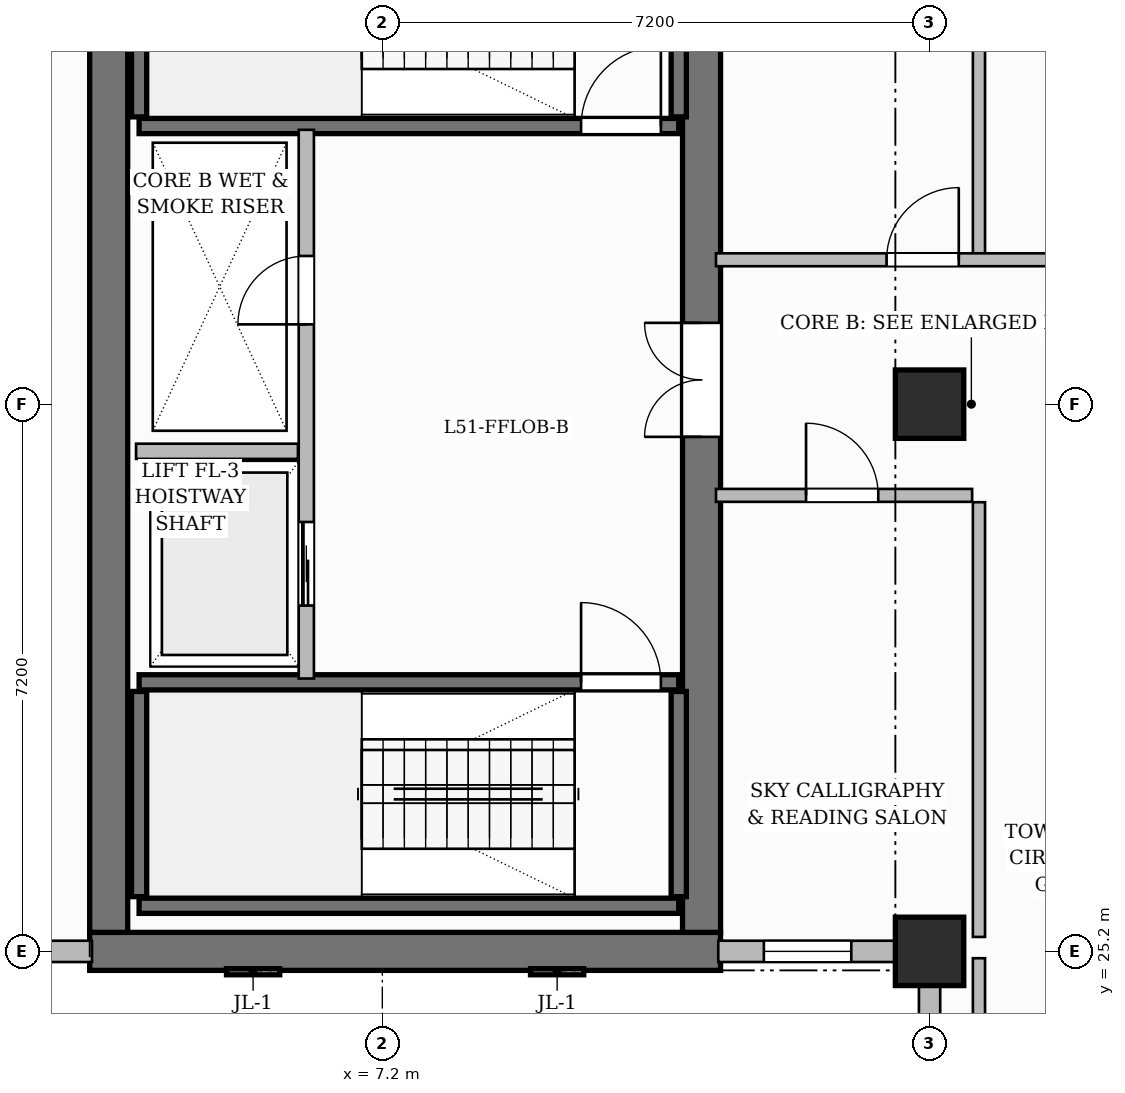
"""IFC4 building model, lengths in metres.
Left out: names, types, materials, properties, quantities, classifications, styles, units other than length and angle.
Written with IfcOpenShell. Run it as: python <this file> out.ifc"""

import sys

from ifc_helpers import new_model, si_unit, direction, frame, frame_2d, origin, origin_2d, place, context, subcontext, project, spatial, rectangle, extrude, source, transform, mapped, element, fill, save


model = new_model("IFC4")
c1 = context("Model", 3, precision=1e-05, world=origin(), true_north=direction((0.0, 1.0)))
c2 = subcontext(c1, "Body", "Model", "MODEL_VIEW")
j1 = project(units=[si_unit("LENGTHUNIT", "METRE"), si_unit("PLANEANGLEUNIT", "RADIAN")], contexts=[c1])
p1 = place(None, origin())
s1 = spatial("IfcSite", under=j1, at=p1, CompositionType="ELEMENT")
p2 = place(p1, origin())
s2 = spatial("IfcBuilding", under=s1, at=p2, CompositionType="ELEMENT")
p3 = place(p2, frame((0.0, 0.0, 205.75)))
s3 = spatial("IfcBuildingStorey", under=s2, at=p3, CompositionType="ELEMENT", Elevation=205.75)
p4 = place(p3, frame((3.35, 25.2, 0.0), z_axis=(0.0, 0.0, 1.0), x_axis=(1.0, 0.0, 0.0)))
e1 = element("IfcWall", 1, at=p4, inside=s3, PredefinedType="SHEAR", context=c2, shape_type="SweptSolid", body=[
    extrude(rectangle(XDim=8.3, YDim=0.5, at=frame_2d((4.15, 0.0))), origin(), (0.0, 0.0, 1.0), 3.85),
])
p5 = place(p3, frame((3.6, 25.45, 0.0), z_axis=(0.0, 0.0, 1.0), x_axis=(0.0, 1.0, 0.0)))
e2 = element("IfcWall", 2, at=p5, inside=s3, PredefinedType="SHEAR", context=c2, shape_type="SweptSolid", body=[
    extrude(rectangle(XDim=13.9, YDim=0.5, at=frame_2d((6.95, 0.0))), origin(), (0.0, 0.0, 1.0), 3.85),
])
p6 = place(p3, frame((11.4, 25.45, 0.0), z_axis=(0.0, 0.0, 1.0), x_axis=(0.0, 1.0, 0.0)))
e3 = element("IfcWall", 3, at=p6, inside=s3, PredefinedType="SHEAR", context=c2, shape_type="SweptSolid", body=[
    extrude(rectangle(XDim=13.9, YDim=0.5, at=frame_2d((6.95, 0.0))), origin(), (0.0, 0.0, 1.0), 3.85),
])
p7 = place(p6, frame((6.52, 0.0, 0.0)))
e4 = element("IfcOpeningElement", 4, at=p7, cuts=e3, PredefinedType="OPENING", context=c2, shape_type="SweptSolid", body=[
    extrude(rectangle(XDim=1.5, YDim=2.2, at=frame_2d((0.75, 1.1))), frame((0.0, 0.26, 0.0), z_axis=(0.0, -1.0, 0.0), x_axis=(1.0, 0.0, 0.0)), (0.0, 0.0, 1.0), 0.52),
])
m1 = source(origin(), c2, "Body", "SweptSolid", [
    extrude(rectangle(XDim=0.9, YDim=0.9, at=origin_2d()), origin(), (0.0, 0.0, 1.0), 3.85),
])
for number, where, z_axis, x_axis in (
    (5, (14.4, 25.2, 0.0), (0.0, 0.0, 1.0), (1.0, 0.0, 0.0)),
    (6, (14.4, 32.4, 0.0), (0.0, 0.0, 1.0), (1.0, 0.0, 0.0)),
):
    element("IfcColumn", number, at=place(p3, frame(where, z_axis=z_axis, x_axis=x_axis)), inside=s3, PredefinedType="COLUMN", context=c2, shape_type="MappedRepresentation", body=[
        mapped(m1, transform((0.0, 0.0, 0.0), scale=1.0)),
    ])
p8 = place(p3, frame((4.0, 25.8, 0.0), z_axis=(0.0, 0.0, 1.0), x_axis=(1.0, 0.0, 0.0)))
e7 = element("IfcWall", 7, at=p8, inside=s3, PredefinedType="SHEAR", context=c2, shape_type="SweptSolid", body=[
    extrude(rectangle(XDim=7.1, YDim=0.2, at=frame_2d((3.55, 0.0))), origin(), (0.0, 0.0, 1.0), 3.85),
])
for number, where, z_axis, x_axis in (
    (8, (4.0, 25.92, 0.0), (0.0, 0.0, 1.0), (0.0, 1.0, 0.0)),
    (9, (11.1, 25.92, 0.0), (0.0, 0.0, 1.0), (0.0, 1.0, 0.0)),
):
    element("IfcWall", number, at=place(p3, frame(where, z_axis=z_axis, x_axis=x_axis)), inside=s3, PredefinedType="SHEAR", context=c2, shape_type="SweptSolid", body=[
        extrude(rectangle(XDim=2.7, YDim=0.2, at=frame_2d((1.35, 0.0))), origin(), (0.0, 0.0, 1.0), 3.85),
    ])
p9 = place(p3, frame((4.0, 28.74, 0.0), z_axis=(0.0, 0.0, 1.0), x_axis=(1.0, 0.0, 0.0)))
e10 = element("IfcWall", 10, at=p9, inside=s3, PredefinedType="SHEAR", context=c2, shape_type="SweptSolid", body=[
    extrude(rectangle(XDim=7.1, YDim=0.2, at=frame_2d((3.55, 0.0))), origin(), (0.0, 0.0, 1.0), 3.85),
])
p10 = place(p9, frame((5.815, 0.0, 0.0)))
e11 = element("IfcOpeningElement", 11, at=p10, cuts=e10, PredefinedType="OPENING", context=c2, shape_type="SweptSolid", body=[
    extrude(rectangle(XDim=1.05, YDim=2.2, at=frame_2d((0.525, 1.1))), frame((0.0, 0.11, 0.0), z_axis=(0.0, -1.0, 0.0), x_axis=(1.0, 0.0, 0.0)), (0.0, 0.0, 1.0), 0.22),
])
for number, where, z_axis, x_axis in (
    (12, (4.0, 36.18, 0.0), (0.0, 0.0, 1.0), (0.0, 1.0, 0.0)),
    (13, (11.1, 36.18, 0.0), (0.0, 0.0, 1.0), (0.0, 1.0, 0.0)),
):
    element("IfcWall", number, at=place(p3, frame(where, z_axis=z_axis, x_axis=x_axis)), inside=s3, PredefinedType="SHEAR", context=c2, shape_type="SweptSolid", body=[
        extrude(rectangle(XDim=2.7, YDim=0.2, at=frame_2d((1.35, 0.0))), origin(), (0.0, 0.0, 1.0), 3.85),
    ])
p11 = place(p3, frame((4.0, 36.06, 0.0), z_axis=(0.0, 0.0, 1.0), x_axis=(1.0, 0.0, 0.0)))
e14 = element("IfcWall", 14, at=p11, inside=s3, PredefinedType="SHEAR", context=c2, shape_type="SweptSolid", body=[
    extrude(rectangle(XDim=7.1, YDim=0.2, at=frame_2d((3.55, 0.0))), origin(), (0.0, 0.0, 1.0), 3.85),
])
p12 = place(p11, frame((5.815, 0.0, 0.0)))
e15 = element("IfcOpeningElement", 15, at=p12, cuts=e14, PredefinedType="OPENING", context=c2, shape_type="SweptSolid", body=[
    extrude(rectangle(XDim=1.05, YDim=2.2, at=frame_2d((0.525, 1.1))), frame((0.0, 0.11, 0.0), z_axis=(0.0, -1.0, 0.0), x_axis=(1.0, 0.0, 0.0)), (0.0, 0.0, 1.0), 0.22),
])
p13 = place(p3, frame((6.2, 28.79, 0.0), z_axis=(0.0, 0.0, 1.0), x_axis=(0.0, 1.0, 0.0)))
e16 = element("IfcWall", 16, at=p13, inside=s3, PredefinedType="PARTITIONING", context=c2, shape_type="SweptSolid", body=[
    extrude(rectangle(XDim=7.22, YDim=0.2, at=frame_2d((3.61, 0.0))), origin(), (0.0, 0.0, 1.0), 3.6),
])
p14 = place(p13, frame((4.66, 0.0, 0.0)))
e17 = element("IfcOpeningElement", 17, at=p14, cuts=e16, PredefinedType="OPENING", context=c2, shape_type="SweptSolid", body=[
    extrude(rectangle(XDim=0.9, YDim=2.1, at=frame_2d((0.45, 1.05))), frame((0.0, 0.11, 0.0), z_axis=(0.0, -1.0, 0.0), x_axis=(1.0, 0.0, 0.0)), (0.0, 0.0, 1.0), 0.22),
])
p15 = place(p13, frame((0.96, 0.0, 0.0)))
e18 = element("IfcOpeningElement", 18, at=p15, cuts=e16, PredefinedType="OPENING", context=c2, shape_type="SweptSolid", body=[
    extrude(rectangle(XDim=1.1, YDim=2.2, at=frame_2d((0.55, 1.1))), frame((0.0, 0.11, 0.0), z_axis=(0.0, -1.0, 0.0), x_axis=(1.0, 0.0, 0.0)), (0.0, 0.0, 1.0), 0.22),
])
p16 = place(p3, frame((3.96, 31.78, 0.0), z_axis=(0.0, 0.0, 1.0), x_axis=(1.0, 0.0, 0.0)))
e19 = element("IfcWall", 19, at=p16, inside=s3, PredefinedType="PARTITIONING", context=c2, shape_type="SweptSolid", body=[
    extrude(rectangle(XDim=2.13, YDim=0.2, at=frame_2d((1.065, 0.0))), origin(), (0.0, 0.0, 1.0), 3.6),
])
p17 = place(p3, frame((15.05, 11.96, 0.0), z_axis=(0.0, 0.0, 1.0), x_axis=(0.0, 1.0, 0.0)))
e20 = element("IfcWall", 20, at=p17, inside=s3, PredefinedType="PARTITIONING", context=c2, shape_type="SweptSolid", body=[
    extrude(rectangle(XDim=13.15, YDim=0.16, at=frame_2d((6.575, 0.0))), origin(), (0.0, 0.0, 1.0), 3.6),
])
p18 = place(p3, frame((15.05, 34.34, 0.0), z_axis=(0.0, 0.0, 1.0), x_axis=(0.0, 1.0, 0.0)))
e21 = element("IfcWall", 21, at=p18, inside=s3, PredefinedType="PARTITIONING", context=c2, shape_type="SweptSolid", body=[
    extrude(rectangle(XDim=5.22, YDim=0.16, at=frame_2d((2.61, 0.0))), origin(), (0.0, 0.0, 1.0), 3.6),
])
p19 = place(p3, frame((15.05, 25.39, 0.0), z_axis=(0.0, 0.0, 1.0), x_axis=(0.0, 1.0, 0.0)))
e22 = element("IfcWall", 22, at=p19, inside=s3, PredefinedType="PARTITIONING", context=c2, shape_type="SweptSolid", body=[
    extrude(rectangle(XDim=5.72, YDim=0.16, at=frame_2d((2.86, 0.0))), origin(), (0.0, 0.0, 1.0), 3.6),
])
p20 = place(p3, frame((11.59, 31.2, 0.0), z_axis=(0.0, 0.0, 1.0), x_axis=(1.0, 0.0, 0.0)))
e23 = element("IfcWall", 23, at=p20, inside=s3, PredefinedType="PARTITIONING", context=c2, shape_type="SweptSolid", body=[
    extrude(rectangle(XDim=3.37, YDim=0.17, at=frame_2d((1.685, 0.0))), origin(), (0.0, 0.0, 1.0), 3.6),
])
p21 = place(p20, frame((1.185, 0.0, 0.0)))
e24 = element("IfcOpeningElement", 24, at=p21, cuts=e23, PredefinedType="OPENING", context=c2, shape_type="SweptSolid", body=[
    extrude(rectangle(XDim=0.95, YDim=2.15, at=frame_2d((0.475, 1.075))), frame((0.0, 0.095, 0.0), z_axis=(0.0, -1.0, 0.0), x_axis=(1.0, 0.0, 0.0)), (0.0, 0.0, 1.0), 0.19),
])
p22 = place(p3, frame((11.59, 34.3, 0.0), z_axis=(0.0, 0.0, 1.0), x_axis=(1.0, 0.0, 0.0)))
e25 = element("IfcWall", 25, at=p22, inside=s3, PredefinedType="PARTITIONING", context=c2, shape_type="SweptSolid", body=[
    extrude(rectangle(XDim=6.262, YDim=0.17, at=frame_2d((3.131, 0.0))), origin(), (0.0, 0.0, 1.0), 3.6),
])
p23 = place(p22, frame((2.244, 0.0, 0.0)))
e26 = element("IfcOpeningElement", 26, at=p23, cuts=e25, PredefinedType="OPENING", context=c2, shape_type="SweptSolid", body=[
    extrude(rectangle(XDim=0.95, YDim=2.15, at=frame_2d((0.475, 1.075))), frame((0.0, 0.095, 0.0), z_axis=(0.0, -1.0, 0.0), x_axis=(1.0, 0.0, 0.0)), (0.0, 0.0, 1.0), 0.19),
])
p24 = place(p3, frame((14.4, 0.05, 0.0), z_axis=(0.0, 0.0, 1.0), x_axis=(0.0, 1.0, 0.0)))
e27 = element("IfcWall", 27, at=p24, inside=s3, PredefinedType="SOLIDWALL", context=c2, shape_type="SweptSolid", body=[
    extrude(rectangle(XDim=25.1, YDim=0.28, at=frame_2d((12.55, 0.0))), origin(), (0.0, 0.0, 1.0), 3.085),
])
p25 = place(p24, frame((2.75, 0.0, 0.0)))
e28 = element("IfcOpeningElement", 28, at=p25, cuts=e27, PredefinedType="OPENING", context=c2, shape_type="SweptSolid", body=[
    extrude(rectangle(XDim=1.2, YDim=2.2, at=frame_2d((0.6, 1.1))), frame((0.0, 0.15, 0.0), z_axis=(0.0, -1.0, 0.0), x_axis=(1.0, 0.0, 0.0)), (0.0, 0.0, 1.0), 0.3),
])
p26 = place(p24, frame((1.025, 0.0, 0.8)))
e29 = element("IfcOpeningElement", 29, at=p26, cuts=e27, PredefinedType="OPENING", context=c2, shape_type="SweptSolid", body=[
    extrude(rectangle(XDim=1.15, YDim=1.8, at=frame_2d((0.575, 0.9))), frame((0.0, 0.15, 0.0), z_axis=(0.0, -1.0, 0.0), x_axis=(1.0, 0.0, 0.0)), (0.0, 0.0, 1.0), 0.3),
])
p27 = place(p24, frame((5.154, 0.0, 0.8)))
e30 = element("IfcOpeningElement", 30, at=p27, cuts=e27, PredefinedType="OPENING", context=c2, shape_type="SweptSolid", body=[
    extrude(rectangle(XDim=0.95, YDim=1.75, at=frame_2d((0.475, 0.875))), frame((0.0, 0.15, 0.0), z_axis=(0.0, -1.0, 0.0), x_axis=(1.0, 0.0, 0.0)), (0.0, 0.0, 1.0), 0.3),
])
p28 = place(p24, frame((8.346, 0.0, 0.8)))
e31 = element("IfcOpeningElement", 31, at=p28, cuts=e27, PredefinedType="OPENING", context=c2, shape_type="SweptSolid", body=[
    extrude(rectangle(XDim=1.15, YDim=1.8, at=frame_2d((0.575, 0.9))), frame((0.0, 0.15, 0.0), z_axis=(0.0, -1.0, 0.0), x_axis=(1.0, 0.0, 0.0)), (0.0, 0.0, 1.0), 0.3),
])
p29 = place(p24, frame((10.285, 0.0, 0.8)))
e32 = element("IfcOpeningElement", 32, at=p29, cuts=e27, PredefinedType="OPENING", context=c2, shape_type="SweptSolid", body=[
    extrude(rectangle(XDim=1.15, YDim=1.8, at=frame_2d((0.575, 0.9))), frame((0.0, 0.15, 0.0), z_axis=(0.0, -1.0, 0.0), x_axis=(1.0, 0.0, 0.0)), (0.0, 0.0, 1.0), 0.3),
])
p30 = place(p24, frame((12.114, 0.0, 0.8)))
e33 = element("IfcOpeningElement", 33, at=p30, cuts=e27, PredefinedType="OPENING", context=c2, shape_type="SweptSolid", body=[
    extrude(rectangle(XDim=1.15, YDim=1.8, at=frame_2d((0.575, 0.9))), frame((0.0, 0.15, 0.0), z_axis=(0.0, -1.0, 0.0), x_axis=(1.0, 0.0, 0.0)), (0.0, 0.0, 1.0), 0.3),
])
p31 = place(p24, frame((15.675, 0.0, 0.8)))
e34 = element("IfcOpeningElement", 34, at=p31, cuts=e27, PredefinedType="OPENING", context=c2, shape_type="SweptSolid", body=[
    extrude(rectangle(XDim=1.8, YDim=1.85, at=frame_2d((0.9, 0.925))), frame((0.0, 0.15, 0.0), z_axis=(0.0, -1.0, 0.0), x_axis=(1.0, 0.0, 0.0)), (0.0, 0.0, 1.0), 0.3),
])
p32 = place(p24, frame((18.425, 0.0, 0.8)))
e35 = element("IfcOpeningElement", 35, at=p32, cuts=e27, PredefinedType="OPENING", context=c2, shape_type="SweptSolid", body=[
    extrude(rectangle(XDim=1.8, YDim=1.85, at=frame_2d((0.9, 0.925))), frame((0.0, 0.15, 0.0), z_axis=(0.0, -1.0, 0.0), x_axis=(1.0, 0.0, 0.0)), (0.0, 0.0, 1.0), 0.3),
])
p33 = place(p24, frame((22.65, 0.0, 0.8)))
e36 = element("IfcOpeningElement", 36, at=p33, cuts=e27, PredefinedType="OPENING", context=c2, shape_type="SweptSolid", body=[
    extrude(rectangle(XDim=1.4, YDim=1.85, at=frame_2d((0.7, 0.925))), frame((0.0, 0.15, 0.0), z_axis=(0.0, -1.0, 0.0), x_axis=(1.0, 0.0, 0.0)), (0.0, 0.0, 1.0), 0.3),
])
p34 = place(p3, frame((11.62, 25.2, 0.0), z_axis=(0.0, 0.0, 1.0), x_axis=(1.0, 0.0, 0.0)))
e37 = element("IfcWall", 37, at=p34, inside=s3, PredefinedType="SOLIDWALL", context=c2, shape_type="SweptSolid", body=[
    extrude(rectangle(XDim=2.78, YDim=0.28, at=frame_2d((1.39, 0.0))), origin(), (0.0, 0.0, 1.0), 3.085),
])
p35 = place(p34, frame((0.6, 0.0, 0.8)))
e38 = element("IfcOpeningElement", 38, at=p35, cuts=e37, PredefinedType="OPENING", context=c2, shape_type="SweptSolid", body=[
    extrude(rectangle(XDim=1.15, YDim=1.8, at=frame_2d((0.575, 0.9))), frame((0.0, 0.15, 0.0), z_axis=(0.0, -1.0, 0.0), x_axis=(1.0, 0.0, 0.0)), (0.0, 0.0, 1.0), 0.3),
])
p36 = place(p3, frame((0.0, 25.2, 0.0), z_axis=(0.0, 0.0, 1.0), x_axis=(1.0, 0.0, 0.0)))
e39 = element("IfcWall", 39, at=p36, inside=s3, PredefinedType="SOLIDWALL", context=c2, shape_type="SweptSolid", body=[
    extrude(rectangle(XDim=3.38, YDim=0.28, at=frame_2d((1.69, 0.0))), origin(), (0.0, 0.0, 1.0), 3.6),
])
p37 = place(p36, frame((1.205, 0.0, 0.8)))
e40 = element("IfcOpeningElement", 40, at=p37, cuts=e39, PredefinedType="OPENING", context=c2, shape_type="SweptSolid", body=[
    extrude(rectangle(XDim=1.4, YDim=1.85, at=frame_2d((0.7, 0.925))), frame((0.0, 0.15, 0.0), z_axis=(0.0, -1.0, 0.0), x_axis=(1.0, 0.0, 0.0)), (0.0, 0.0, 1.0), 0.3),
])
m2 = source(origin(), c2, "Body", "SweptSolid", [
    extrude(rectangle(XDim=1.05, YDim=2.2, at=frame_2d((0.525, 1.1))), frame((0.0, 0.025, 0.0), z_axis=(0.0, -1.0, 0.0), x_axis=(1.0, 0.0, 0.0)), (0.0, 0.0, 1.0), 0.05),
])
p38 = place(p10, origin())
e41 = element("IfcDoor", 41, at=p38, inside=s3, OperationType="SINGLE_SWING_LEFT", PredefinedType="DOOR", context=c2, shape_type="MappedRepresentation", body=[
    mapped(m2, transform((0.0, 0.0, 0.0), scale=1.0)),
])
fill(e11, e41)
p39 = place(p12, origin())
e42 = element("IfcDoor", 42, at=p39, inside=s3, OperationType="SINGLE_SWING_RIGHT", PredefinedType="DOOR", context=c2, shape_type="MappedRepresentation", body=[
    mapped(m2, transform((0.0, 0.0, 0.0), scale=1.0)),
])
fill(e15, e42)
m3 = source(origin(), c2, "Body", "SweptSolid", [
    extrude(rectangle(XDim=0.9, YDim=2.1, at=frame_2d((0.45, 1.05))), frame((0.0, 0.025, 0.0), z_axis=(0.0, -1.0, 0.0), x_axis=(1.0, 0.0, 0.0)), (0.0, 0.0, 1.0), 0.05),
])
p40 = place(p14, origin())
e43 = element("IfcDoor", 43, at=p40, inside=s3, OperationType="SINGLE_SWING_LEFT", PredefinedType="DOOR", context=c2, shape_type="MappedRepresentation", body=[
    mapped(m3, transform((0.0, 0.0, 0.0), scale=1.0)),
])
fill(e17, e43)
m4 = source(origin(), c2, "Body", "SweptSolid", [
    extrude(rectangle(XDim=1.5, YDim=2.2, at=frame_2d((0.75, 1.1))), frame((0.0, 0.025, 0.0), z_axis=(0.0, -1.0, 0.0), x_axis=(1.0, 0.0, 0.0)), (0.0, 0.0, 1.0), 0.05),
])
p41 = place(p7, origin())
e44 = element("IfcDoor", 44, at=p41, inside=s3, OperationType="DOUBLE_DOOR_SINGLE_SWING", PredefinedType="DOOR", context=c2, shape_type="MappedRepresentation", body=[
    mapped(m4, transform((0.0, 0.0, 0.0), scale=1.0)),
])
fill(e4, e44)
m5 = source(origin(), c2, "Body", "SweptSolid", [
    extrude(rectangle(XDim=0.95, YDim=2.15, at=frame_2d((0.475, 1.075))), frame((0.0, 0.025, 0.0), z_axis=(0.0, -1.0, 0.0), x_axis=(1.0, 0.0, 0.0)), (0.0, 0.0, 1.0), 0.05),
])
p42 = place(p21, origin())
e45 = element("IfcDoor", 45, at=p42, inside=s3, OperationType="SINGLE_SWING_LEFT", PredefinedType="DOOR", context=c2, shape_type="MappedRepresentation", body=[
    mapped(m5, transform((0.0, 0.0, 0.0), scale=1.0)),
])
fill(e24, e45)
p43 = place(p23, origin())
e46 = element("IfcDoor", 46, at=p43, inside=s3, OperationType="SINGLE_SWING_RIGHT", PredefinedType="DOOR", context=c2, shape_type="MappedRepresentation", body=[
    mapped(m5, transform((0.0, 0.0, 0.0), scale=1.0)),
])
fill(e26, e46)
m6 = source(origin(), c2, "Body", "SweptSolid", [
    extrude(rectangle(XDim=1.1, YDim=2.2, at=frame_2d((0.55, 1.1))), frame((0.0, 0.025, 0.0), z_axis=(0.0, -1.0, 0.0), x_axis=(1.0, 0.0, 0.0)), (0.0, 0.0, 1.0), 0.05),
])
p44 = place(p15, origin())
e47 = element("IfcDoor", 47, at=p44, inside=s3, OperationType="SLIDING_TO_LEFT", PredefinedType="DOOR", context=c2, shape_type="MappedRepresentation", body=[
    mapped(m6, transform((0.0, 0.0, 0.0), scale=1.0)),
])
fill(e18, e47)
m7 = source(origin(), c2, "Body", "SweptSolid", [
    extrude(rectangle(XDim=1.15, YDim=1.8, at=frame_2d((0.575, 0.9))), frame((0.0, 0.03, 0.0), z_axis=(0.0, -1.0, 0.0), x_axis=(1.0, 0.0, 0.0)), (0.0, 0.0, 1.0), 0.06),
])
p45 = place(p35, origin())
e48 = element("IfcWindow", 48, at=p45, inside=s3, PartitioningType="SINGLE_PANEL", PredefinedType="WINDOW", context=c2, shape_type="MappedRepresentation", body=[
    mapped(m7, transform((0.0, 0.0, 0.0), scale=1.0)),
])
fill(e38, e48)
save(model, sys.argv[1])
